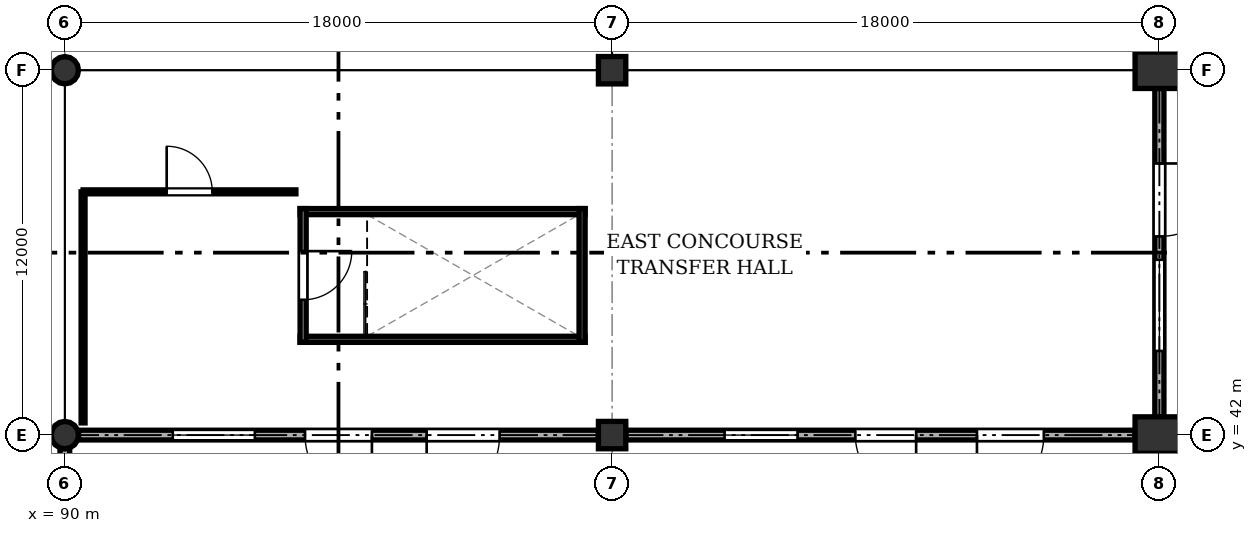
"""IFC4 building model, lengths in metres.
Left out: names, types, materials, properties, quantities, classifications, styles, units other than length and angle.
Written with IfcOpenShell. Run it as: python <this file> out.ifc"""

import sys

from ifc_helpers import new_model, si_unit, direction, frame, frame_2d, origin, origin_2d, place, context, subcontext, project, spatial, rectangle, circle, extrude, element, fill, save


model = new_model("IFC4")
c1 = context("Model", 3, precision=1e-05, world=origin(), true_north=direction((0.0, 1.0)))
c2 = subcontext(c1, "Body", "Model", "MODEL_VIEW")
j1 = project(units=[si_unit("LENGTHUNIT", "METRE"), si_unit("PLANEANGLEUNIT", "RADIAN")], contexts=[c1])
p1 = place(None, origin())
s1 = spatial("IfcSite", under=j1, at=p1, CompositionType="ELEMENT")
p2 = place(p1, origin())
s2 = spatial("IfcBuilding", under=s1, at=p2, CompositionType="ELEMENT")
p3 = place(p2, origin())
s3 = spatial("IfcBuildingStorey", under=s2, at=p3, CompositionType="ELEMENT", Elevation=0.0)
for number, where, z_axis, x_axis in (
    (1, (90.0, 42.0, 0.0), (0.0, 0.0, 1.0), (1.0, 0.0, 0.0)),
    (2, (90.0, 54.0, 0.0), (0.0, 0.0, 1.0), (1.0, 0.0, 0.0)),
):
    element("IfcColumn", number, at=place(p3, frame(where, z_axis=z_axis, x_axis=x_axis)), inside=s3, PredefinedType="COLUMN", context=c2, shape_type="SweptSolid", body=[
        extrude(circle(Radius=0.45, at=origin_2d()), origin(), (0.0, 0.0, 1.0), 6.6),
    ])
for number, where, z_axis, x_axis in (
    (3, (108.0, 42.0, 0.0), (0.0, 0.0, 1.0), (1.0, 0.0, 0.0)),
    (4, (108.0, 54.0, 0.0), (0.0, 0.0, 1.0), (1.0, 0.0, 0.0)),
):
    element("IfcColumn", number, at=place(p3, frame(where, z_axis=z_axis, x_axis=x_axis)), inside=s3, PredefinedType="COLUMN", context=c2, shape_type="SweptSolid", body=[
        extrude(rectangle(XDim=0.9, YDim=0.9, at=origin_2d()), origin(), (0.0, 0.0, 1.0), 6.6),
    ])
for number, where, z_axis, x_axis in (
    (5, (126.0, 42.0, 0.0), (0.0, 0.0, 1.0), (1.0, 0.0, 0.0)),
    (6, (126.0, 54.0, 0.0), (0.0, 0.0, 1.0), (1.0, 0.0, 0.0)),
):
    element("IfcColumn", number, at=place(p3, frame(where, z_axis=z_axis, x_axis=x_axis)), inside=s3, PredefinedType="COLUMN", context=c2, shape_type="SweptSolid", body=[
        extrude(rectangle(XDim=1.6, YDim=1.2, at=origin_2d()), origin(), (0.0, 0.0, 1.0), 6.6),
    ])
p4 = place(p3, frame((90.0, 41.55, 0.0), z_axis=(0.0, 0.0, 1.0), x_axis=(0.0, -1.0, 0.0)))
e7 = element("IfcWall", 7, at=p4, inside=s3, PredefinedType="SOLIDWALL", context=c2, shape_type="SweptSolid", body=[
    extrude(rectangle(XDim=11.1, YDim=0.32, at=frame_2d((5.55, 0.0))), origin(), (0.0, 0.0, 1.0), 5.595),
])
p5 = place(p4, frame((2.417, 0.0, 0.95)))
e8 = element("IfcOpeningElement", 8, at=p5, cuts=e7, PredefinedType="OPENING", context=c2, shape_type="SweptSolid", body=[
    extrude(rectangle(XDim=1.6, YDim=1.9, at=frame_2d((0.8, 0.95))), frame((0.0, 0.17, 0.0), z_axis=(0.0, -1.0, 0.0), x_axis=(1.0, 0.0, 0.0)), (0.0, 0.0, 1.0), 0.34),
])
p6 = place(p4, frame((6.983, 0.0, 0.95)))
e9 = element("IfcOpeningElement", 9, at=p6, cuts=e7, PredefinedType="OPENING", context=c2, shape_type="SweptSolid", body=[
    extrude(rectangle(XDim=3.0, YDim=2.1, at=frame_2d((1.5, 1.05))), frame((0.0, 0.17, 0.0), z_axis=(0.0, -1.0, 0.0), x_axis=(1.0, 0.0, 0.0)), (0.0, 0.0, 1.0), 0.34),
])
p7 = place(p3, frame((107.55, 42.0, 0.0), z_axis=(0.0, 0.0, 1.0), x_axis=(-1.0, 0.0, 0.0)))
e10 = element("IfcWall", 10, at=p7, inside=s3, PredefinedType="SOLIDWALL", context=c2, shape_type="SweptSolid", body=[
    extrude(rectangle(XDim=17.1, YDim=0.32, at=frame_2d((8.55, 0.0))), origin(), (0.0, 0.0, 1.0), 5.595),
])
p8 = place(p7, frame((3.25, 0.0, 0.0)))
e11 = element("IfcOpeningElement", 11, at=p8, cuts=e10, PredefinedType="OPENING", context=c2, shape_type="SweptSolid", body=[
    extrude(rectangle(XDim=2.4, YDim=2.5, at=frame_2d((1.2, 1.25))), frame((0.0, 0.17, 0.0), z_axis=(0.0, -1.0, 0.0), x_axis=(1.0, 0.0, 0.0)), (0.0, 0.0, 1.0), 0.34),
])
p9 = place(p7, frame((7.45, 0.0, 0.0)))
e12 = element("IfcOpeningElement", 12, at=p9, cuts=e10, PredefinedType="OPENING", context=c2, shape_type="SweptSolid", body=[
    extrude(rectangle(XDim=2.2, YDim=2.45, at=frame_2d((1.1, 1.225))), frame((0.0, 0.17, 0.0), z_axis=(0.0, -1.0, 0.0), x_axis=(1.0, 0.0, 0.0)), (0.0, 0.0, 1.0), 0.34),
])
p10 = place(p7, frame((11.3, 0.0, 0.95)))
e13 = element("IfcOpeningElement", 13, at=p10, cuts=e10, PredefinedType="OPENING", context=c2, shape_type="SweptSolid", body=[
    extrude(rectangle(XDim=2.7, YDim=2.1, at=frame_2d((1.35, 1.05))), frame((0.0, 0.17, 0.0), z_axis=(0.0, -1.0, 0.0), x_axis=(1.0, 0.0, 0.0)), (0.0, 0.0, 1.0), 0.34),
])
p11 = place(p3, frame((125.2, 42.0, 0.0), z_axis=(0.0, 0.0, 1.0), x_axis=(-1.0, 0.0, 0.0)))
e14 = element("IfcWall", 14, at=p11, inside=s3, PredefinedType="SOLIDWALL", context=c2, shape_type="SweptSolid", body=[
    extrude(rectangle(XDim=16.75, YDim=0.32, at=frame_2d((8.375, 0.0))), origin(), (0.0, 0.0, 1.0), 6.225),
])
p12 = place(p11, frame((3.0, 0.0, 0.0)))
e15 = element("IfcOpeningElement", 15, at=p12, cuts=e14, PredefinedType="OPENING", context=c2, shape_type="SweptSolid", body=[
    extrude(rectangle(XDim=2.2, YDim=2.45, at=frame_2d((1.1, 1.225))), frame((0.0, 0.17, 0.0), z_axis=(0.0, -1.0, 0.0), x_axis=(1.0, 0.0, 0.0)), (0.0, 0.0, 1.0), 0.34),
])
p13 = place(p11, frame((7.2, 0.0, 0.0)))
e16 = element("IfcOpeningElement", 16, at=p13, cuts=e14, PredefinedType="OPENING", context=c2, shape_type="SweptSolid", body=[
    extrude(rectangle(XDim=2.0, YDim=2.4, at=frame_2d((1.0, 1.2))), frame((0.0, 0.17, 0.0), z_axis=(0.0, -1.0, 0.0), x_axis=(1.0, 0.0, 0.0)), (0.0, 0.0, 1.0), 0.34),
])
p14 = place(p11, frame((11.1, 0.0, 0.95)))
e17 = element("IfcOpeningElement", 17, at=p14, cuts=e14, PredefinedType="OPENING", context=c2, shape_type="SweptSolid", body=[
    extrude(rectangle(XDim=2.4, YDim=2.1, at=frame_2d((1.2, 1.05))), frame((0.0, 0.17, 0.0), z_axis=(0.0, -1.0, 0.0), x_axis=(1.0, 0.0, 0.0)), (0.0, 0.0, 1.0), 0.34),
])
p15 = place(p3, frame((126.0, 53.4, 0.0), z_axis=(0.0, 0.0, 1.0), x_axis=(0.0, -1.0, 0.0)))
e18 = element("IfcWall", 18, at=p15, inside=s3, PredefinedType="SOLIDWALL", context=c2, shape_type="SweptSolid", body=[
    extrude(rectangle(XDim=10.8, YDim=0.3, at=frame_2d((5.4, 0.0))), origin(), (0.0, 0.0, 1.0), 6.225),
])
p16 = place(p15, frame((2.467, 0.0, 0.0)))
e19 = element("IfcOpeningElement", 19, at=p16, cuts=e18, PredefinedType="OPENING", context=c2, shape_type="SweptSolid", body=[
    extrude(rectangle(XDim=2.4, YDim=2.5, at=frame_2d((1.2, 1.25))), frame((0.0, 0.16, 0.0), z_axis=(0.0, -1.0, 0.0), x_axis=(1.0, 0.0, 0.0)), (0.0, 0.0, 1.0), 0.32),
])
p17 = place(p15, frame((5.633, 0.0, 0.95)))
e20 = element("IfcOpeningElement", 20, at=p17, cuts=e18, PredefinedType="OPENING", context=c2, shape_type="SweptSolid", body=[
    extrude(rectangle(XDim=3.0, YDim=2.1, at=frame_2d((1.5, 1.05))), frame((0.0, 0.16, 0.0), z_axis=(0.0, -1.0, 0.0), x_axis=(1.0, 0.0, 0.0)), (0.0, 0.0, 1.0), 0.32),
])
for number, where, z_axis, x_axis in (
    (21, (97.738, 45.15, 0.0), (0.0, 0.0, 1.0), (1.0, 0.0, 0.0)),
    (22, (107.113, 49.35, 0.0), (0.0, 0.0, 1.0), (-1.0, 0.0, 0.0)),
):
    element("IfcWall", number, at=place(p3, frame(where, z_axis=z_axis, x_axis=x_axis)), inside=s3, PredefinedType="SOLIDWALL", context=c2, shape_type="SweptSolid", body=[
        extrude(rectangle(XDim=9.375, YDim=0.2, at=frame_2d((4.688, 0.0))), origin(), (0.0, 0.0, 1.0), 2.45),
    ])
p18 = place(p3, frame((107.012, 45.05, 0.0), z_axis=(0.0, 0.0, 1.0), x_axis=(0.0, 1.0, 0.0)))
e23 = element("IfcWall", 23, at=p18, inside=s3, PredefinedType="SOLIDWALL", context=c2, shape_type="SweptSolid", body=[
    extrude(rectangle(XDim=4.4, YDim=0.2, at=frame_2d((2.2, 0.0))), origin(), (0.0, 0.0, 1.0), 2.45),
])
p19 = place(p3, frame((97.837, 49.45, 0.0), z_axis=(0.0, 0.0, 1.0), x_axis=(0.0, -1.0, 0.0)))
e24 = element("IfcWall", 24, at=p19, inside=s3, PredefinedType="SOLIDWALL", context=c2, shape_type="SweptSolid", body=[
    extrude(rectangle(XDim=4.4, YDim=0.2, at=frame_2d((2.2, 0.0))), origin(), (0.0, 0.0, 1.0), 2.45),
])
p20 = place(p19, frame((1.4, 0.0, 0.0)))
e25 = element("IfcOpeningElement", 25, at=p20, cuts=e24, PredefinedType="OPENING", context=c2, shape_type="SweptSolid", body=[
    extrude(rectangle(XDim=1.6, YDim=2.15, at=frame_2d((0.8, 1.075))), frame((0.0, 0.11, 0.0), z_axis=(0.0, -1.0, 0.0), x_axis=(1.0, 0.0, 0.0)), (0.0, 0.0, 1.0), 0.22),
])
p21 = place(p3, frame((90.6, 50.0, 0.0), z_axis=(0.0, 0.0, 1.0), x_axis=(1.0, 0.0, 0.0)))
e26 = element("IfcWall", 26, at=p21, inside=s3, PredefinedType="PARTITIONING", context=c2, shape_type="SweptSolid", body=[
    extrude(rectangle(XDim=7.0, YDim=0.13, at=frame_2d((3.5, 0.0))), origin(), (0.0, 0.0, 1.0), 4.4),
])
p22 = place(p21, frame((2.75, 0.0, 0.0)))
e27 = element("IfcOpeningElement", 27, at=p22, cuts=e26, PredefinedType="OPENING", context=c2, shape_type="SweptSolid", body=[
    extrude(rectangle(XDim=1.5, YDim=2.15, at=frame_2d((0.75, 1.075))), frame((0.0, 0.075, 0.0), z_axis=(0.0, -1.0, 0.0), x_axis=(1.0, 0.0, 0.0)), (0.0, 0.0, 1.0), 0.15),
])
p23 = place(p3, frame((90.6, 42.4, 0.0), z_axis=(0.0, 0.0, 1.0), x_axis=(0.0, 1.0, 0.0)))
e28 = element("IfcWall", 28, at=p23, inside=s3, PredefinedType="PARTITIONING", context=c2, shape_type="SweptSolid", body=[
    extrude(rectangle(XDim=7.6, YDim=0.13, at=frame_2d((3.8, 0.0))), origin(), (0.0, 0.0, 1.0), 4.4),
])
p24 = place(p8, origin())
e29 = element("IfcDoor", 29, at=p24, inside=s3, OperationType="SINGLE_SWING_RIGHT", PredefinedType="DOOR", context=c2, shape_type="SweptSolid", body=[
    extrude(rectangle(XDim=2.4, YDim=2.5, at=frame_2d((1.2, 1.25))), frame((0.0, 0.025, 0.0), z_axis=(0.0, -1.0, 0.0), x_axis=(1.0, 0.0, 0.0)), (0.0, 0.0, 1.0), 0.05),
])
fill(e11, e29)
p25 = place(p9, origin())
e30 = element("IfcDoor", 30, at=p25, inside=s3, OperationType="SINGLE_SWING_LEFT", PredefinedType="DOOR", context=c2, shape_type="SweptSolid", body=[
    extrude(rectangle(XDim=2.2, YDim=2.45, at=frame_2d((1.1, 1.225))), frame((0.0, 0.025, 0.0), z_axis=(0.0, -1.0, 0.0), x_axis=(1.0, 0.0, 0.0)), (0.0, 0.0, 1.0), 0.05),
])
fill(e12, e30)
p26 = place(p10, origin())
e31 = element("IfcWindow", 31, at=p26, inside=s3, PartitioningType="SINGLE_PANEL", PredefinedType="WINDOW", context=c2, shape_type="SweptSolid", body=[
    extrude(rectangle(XDim=2.7, YDim=2.1, at=frame_2d((1.35, 1.05))), frame((0.0, 0.03, 0.0), z_axis=(0.0, -1.0, 0.0), x_axis=(1.0, 0.0, 0.0)), (0.0, 0.0, 1.0), 0.06),
])
fill(e13, e31)
p27 = place(p12, origin())
e32 = element("IfcDoor", 32, at=p27, inside=s3, OperationType="SINGLE_SWING_RIGHT", PredefinedType="DOOR", context=c2, shape_type="SweptSolid", body=[
    extrude(rectangle(XDim=2.2, YDim=2.45, at=frame_2d((1.1, 1.225))), frame((0.0, 0.025, 0.0), z_axis=(0.0, -1.0, 0.0), x_axis=(1.0, 0.0, 0.0)), (0.0, 0.0, 1.0), 0.05),
])
fill(e15, e32)
p28 = place(p13, origin())
e33 = element("IfcDoor", 33, at=p28, inside=s3, OperationType="SINGLE_SWING_LEFT", PredefinedType="DOOR", context=c2, shape_type="SweptSolid", body=[
    extrude(rectangle(XDim=2.0, YDim=2.4, at=frame_2d((1.0, 1.2))), frame((0.0, 0.025, 0.0), z_axis=(0.0, -1.0, 0.0), x_axis=(1.0, 0.0, 0.0)), (0.0, 0.0, 1.0), 0.05),
])
fill(e16, e33)
p29 = place(p14, origin())
e34 = element("IfcWindow", 34, at=p29, inside=s3, PartitioningType="SINGLE_PANEL", PredefinedType="WINDOW", context=c2, shape_type="SweptSolid", body=[
    extrude(rectangle(XDim=2.4, YDim=2.1, at=frame_2d((1.2, 1.05))), frame((0.0, 0.03, 0.0), z_axis=(0.0, -1.0, 0.0), x_axis=(1.0, 0.0, 0.0)), (0.0, 0.0, 1.0), 0.06),
])
fill(e17, e34)
p30 = place(p16, origin())
e35 = element("IfcDoor", 35, at=p30, inside=s3, OperationType="SINGLE_SWING_LEFT", PredefinedType="DOOR", context=c2, shape_type="SweptSolid", body=[
    extrude(rectangle(XDim=2.4, YDim=2.5, at=frame_2d((1.2, 1.25))), frame((0.0, 0.025, 0.0), z_axis=(0.0, -1.0, 0.0), x_axis=(1.0, 0.0, 0.0)), (0.0, 0.0, 1.0), 0.05),
])
fill(e19, e35)
p31 = place(p17, origin())
e36 = element("IfcWindow", 36, at=p31, inside=s3, PartitioningType="SINGLE_PANEL", PredefinedType="WINDOW", context=c2, shape_type="SweptSolid", body=[
    extrude(rectangle(XDim=3.0, YDim=2.1, at=frame_2d((1.5, 1.05))), frame((0.0, 0.03, 0.0), z_axis=(0.0, -1.0, 0.0), x_axis=(1.0, 0.0, 0.0)), (0.0, 0.0, 1.0), 0.06),
])
fill(e20, e36)
p32 = place(p20, origin())
e37 = element("IfcDoor", 37, at=p32, inside=s3, OperationType="SINGLE_SWING_LEFT", PredefinedType="DOOR", context=c2, shape_type="SweptSolid", body=[
    extrude(rectangle(XDim=1.6, YDim=2.15, at=frame_2d((0.8, 1.075))), frame((0.0, 0.025, 0.0), z_axis=(0.0, -1.0, 0.0), x_axis=(1.0, 0.0, 0.0)), (0.0, 0.0, 1.0), 0.05),
])
fill(e25, e37)
p33 = place(p22, origin())
e38 = element("IfcDoor", 38, at=p33, inside=s3, OperationType="SINGLE_SWING_LEFT", PredefinedType="DOOR", context=c2, shape_type="SweptSolid", body=[
    extrude(rectangle(XDim=1.5, YDim=2.15, at=frame_2d((0.75, 1.075))), frame((0.0, 0.025, 0.0), z_axis=(0.0, -1.0, 0.0), x_axis=(1.0, 0.0, 0.0)), (0.0, 0.0, 1.0), 0.05),
])
fill(e27, e38)
save(model, sys.argv[1])
